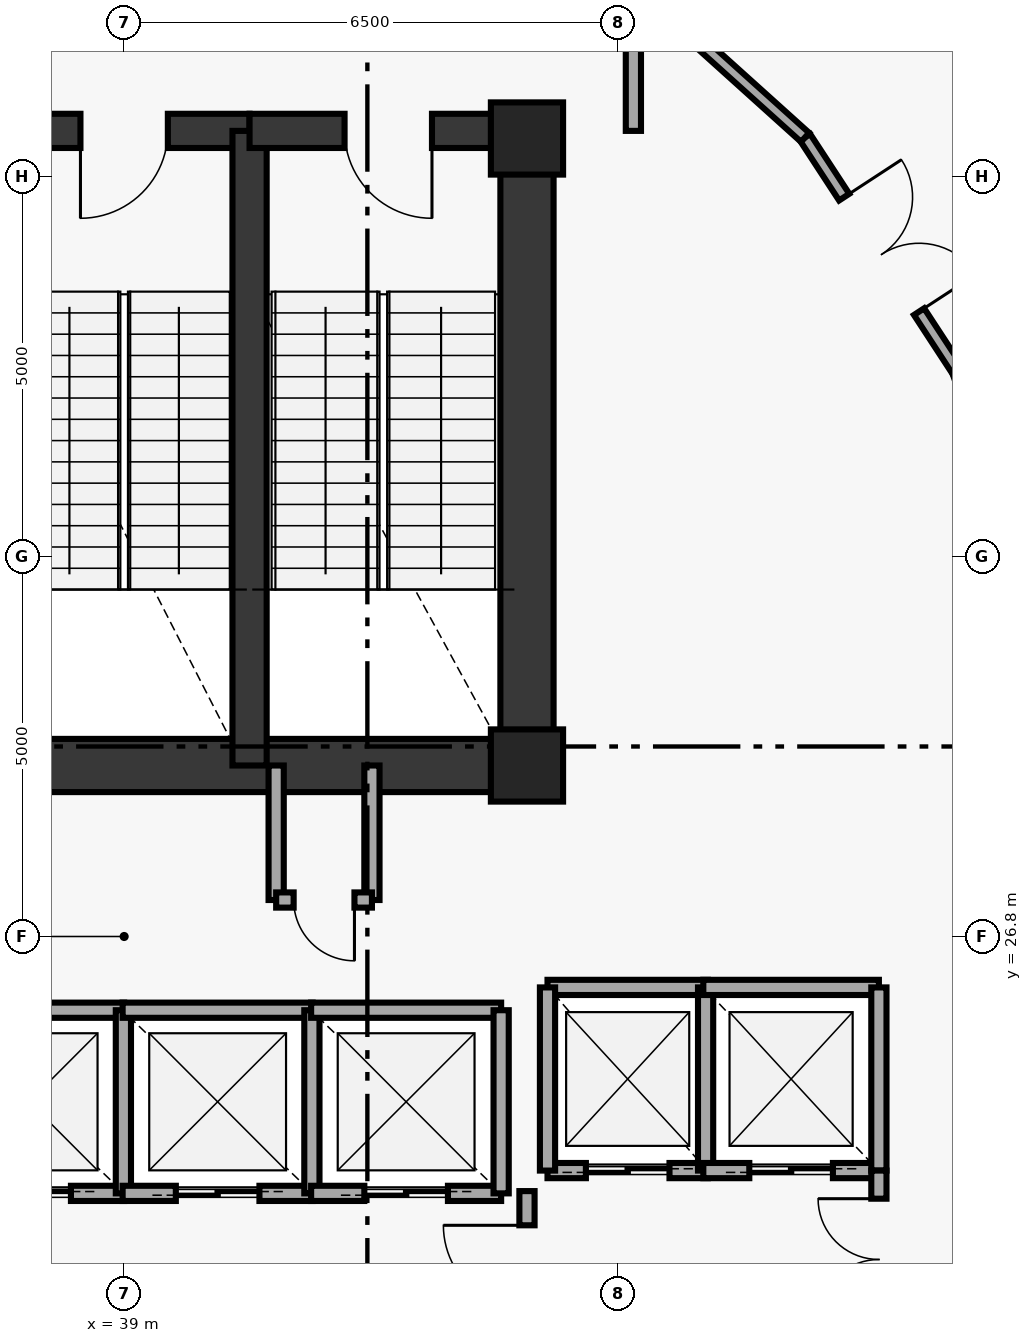
"""IFC4 building model, lengths in metres.
Left out: names, types, materials, properties, quantities, classifications, styles, units other than length and angle.
Written with IfcOpenShell. Run it as: python <this file> out.ifc"""

import sys

from ifc_helpers import new_model, si_unit, direction, frame, frame_2d, origin, origin_2d, place, context, subcontext, project, spatial, rectangle, extrude, element, fill, save


model = new_model("IFC4")
c1 = context("Model", 3, precision=1e-05, world=origin(), true_north=direction((0.0, 1.0)))
c2 = subcontext(c1, "Body", "Model", "MODEL_VIEW")
j1 = project(units=[si_unit("LENGTHUNIT", "METRE"), si_unit("PLANEANGLEUNIT", "RADIAN")], contexts=[c1])
p1 = place(None, origin())
s1 = spatial("IfcSite", under=j1, at=p1, CompositionType="ELEMENT")
p2 = place(p1, origin())
s2 = spatial("IfcBuilding", under=s1, at=p2, CompositionType="ELEMENT")
p3 = place(p2, frame((0.0, 0.0, 113.25)))
s3 = spatial("IfcBuildingStorey", under=s2, at=p3, CompositionType="ELEMENT", Elevation=113.25)
for number, where, z_axis, x_axis in (
    (1, (44.3, 29.05, 0.0), (0.0, 0.0, 1.0), (1.0, 0.0, 0.0)),
    (2, (44.3, 37.3, 0.0), (0.0, 0.0, 1.0), (1.0, 0.0, 0.0)),
):
    element("IfcColumn", number, at=place(p3, frame(where, z_axis=z_axis, x_axis=x_axis)), inside=s3, PredefinedType="PILASTER", context=c2, shape_type="SweptSolid", body=[
        extrude(rectangle(XDim=0.95, YDim=0.95, at=origin_2d()), origin(), (0.0, 0.0, 1.0), 4.75),
    ])
p4 = place(p3, frame((44.3, 29.05, 0.0), z_axis=(0.0, 0.0, 1.0), x_axis=(0.0, 1.0, 0.0)))
e3 = element("IfcWall", 3, at=p4, inside=s3, PredefinedType="SHEAR", context=c2, shape_type="SweptSolid", body=[
    extrude(rectangle(XDim=8.35, YDim=0.7, at=frame_2d((4.175, 0.0))), origin(), (0.0, 0.0, 1.0), 4.75),
])
p5 = place(p3, frame((33.7, 29.05, 0.0), z_axis=(0.0, 0.0, 1.0), x_axis=(1.0, 0.0, 0.0)))
e4 = element("IfcWall", 4, at=p5, inside=s3, PredefinedType="SHEAR", context=c2, shape_type="SweptSolid", body=[
    extrude(rectangle(XDim=10.6, YDim=0.7, at=frame_2d((5.3, 0.0))), origin(), (0.0, 0.0, 1.0), 4.75),
])
p6 = place(p3, frame((40.65, 37.4, 0.0), z_axis=(0.0, 0.0, 1.0), x_axis=(-1.0, 0.0, 0.0)))
e5 = element("IfcWall", 5, at=p6, inside=s3, PredefinedType="SHEAR", context=c2, shape_type="SweptSolid", body=[
    extrude(rectangle(XDim=3.3, YDim=0.45, at=frame_2d((1.65, 0.0))), origin(), (0.0, 0.0, 1.0), 4.75),
])
p7 = place(p6, frame((1.075, 0.0, 0.0)))
e6 = element("IfcOpeningElement", 6, at=p7, cuts=e5, PredefinedType="OPENING", context=c2, shape_type="SweptSolid", body=[
    extrude(rectangle(XDim=1.15, YDim=2.15, at=frame_2d((0.575, 1.075))), frame((0.0, 0.235, 0.0), z_axis=(0.0, -1.0, 0.0), x_axis=(1.0, 0.0, 0.0)), (0.0, 0.0, 1.0), 0.47),
])
p8 = place(p3, frame((40.65, 29.05, 0.0), z_axis=(0.0, 0.0, 1.0), x_axis=(0.0, 1.0, 0.0)))
e7 = element("IfcWall", 7, at=p8, inside=s3, PredefinedType="SHEAR", context=c2, shape_type="SweptSolid", body=[
    extrude(rectangle(XDim=8.35, YDim=0.45, at=frame_2d((4.175, 0.0))), origin(), (0.0, 0.0, 1.0), 4.75),
])
p9 = place(p3, frame((44.3, 37.4, 0.0), z_axis=(0.0, 0.0, 1.0), x_axis=(-1.0, 0.0, 0.0)))
e8 = element("IfcWall", 8, at=p9, inside=s3, PredefinedType="SHEAR", context=c2, shape_type="SweptSolid", body=[
    extrude(rectangle(XDim=3.65, YDim=0.45, at=frame_2d((1.825, 0.0))), origin(), (0.0, 0.0, 1.0), 4.75),
])
p10 = place(p9, frame((1.25, 0.0, 0.0)))
e9 = element("IfcOpeningElement", 9, at=p10, cuts=e8, PredefinedType="OPENING", context=c2, shape_type="SweptSolid", body=[
    extrude(rectangle(XDim=1.15, YDim=2.15, at=frame_2d((0.575, 1.075))), frame((0.0, 0.235, 0.0), z_axis=(0.0, -1.0, 0.0), x_axis=(1.0, 0.0, 0.0)), (0.0, 0.0, 1.0), 0.47),
])
p11 = place(p3, frame((45.7, 37.4, 0.0), z_axis=(0.0, 0.0, 1.0), x_axis=(0.0, 1.0, 0.0)))
e10 = element("IfcWall", 10, at=p11, inside=s3, PredefinedType="SOLIDWALL", context=c2, shape_type="SweptSolid", body=[
    extrude(rectangle(XDim=1.88, YDim=0.2, at=frame_2d((0.94, 0.0))), origin(), (0.0, 0.0, 1.0), 4.75),
])
for number, where, z_axis, x_axis in (
    (11, (41.0, 27.28, 0.0), (0.0, 0.0, 1.0), (0.0, 1.0, 0.0)),
    (12, (42.26, 27.28, 0.0), (0.0, 0.0, 1.0), (0.0, 1.0, 0.0)),
):
    element("IfcWall", number, at=place(p3, frame(where, z_axis=z_axis, x_axis=x_axis)), inside=s3, PredefinedType="SOLIDWALL", context=c2, shape_type="SweptSolid", body=[
        extrude(rectangle(XDim=1.77, YDim=0.2, at=frame_2d((0.885, 0.0))), origin(), (0.0, 0.0, 1.0), 4.75),
    ])
p12 = place(p3, frame((41.0, 27.28, 0.0), z_axis=(0.0, 0.0, 1.0), x_axis=(1.0, 0.0, 0.0)))
e13 = element("IfcWall", 13, at=p12, inside=s3, PredefinedType="SOLIDWALL", context=c2, shape_type="SweptSolid", body=[
    extrude(rectangle(XDim=1.26, YDim=0.2, at=frame_2d((0.63, 0.0))), origin(), (0.0, 0.0, 1.0), 4.75),
])
p13 = place(p12, frame((0.23, 0.0, 0.0)))
e14 = element("IfcOpeningElement", 14, at=p13, cuts=e13, PredefinedType="OPENING", context=c2, shape_type="SweptSolid", body=[
    extrude(rectangle(XDim=0.8, YDim=2.05, at=frame_2d((0.4, 1.025))), frame((0.0, 0.11, 0.0), z_axis=(0.0, -1.0, 0.0), x_axis=(1.0, 0.0, 0.0)), (0.0, 0.0, 1.0), 0.22),
])
p14 = place(p3, frame((44.57, 23.72, 0.0), z_axis=(0.0, 0.0, 1.0), x_axis=(1.0, 0.0, 0.0)))
e15 = element("IfcWall", 15, at=p14, inside=s3, PredefinedType="SOLIDWALL", context=c2, shape_type="SweptSolid", body=[
    extrude(rectangle(XDim=2.11, YDim=0.2, at=frame_2d((1.055, 0.0))), origin(), (0.0, 0.0, 1.0), 4.75),
])
p15 = place(p14, frame((0.505, 0.0, 0.0)))
e16 = element("IfcOpeningElement", 16, at=p15, cuts=e15, PredefinedType="OPENING", context=c2, shape_type="SweptSolid", body=[
    extrude(rectangle(XDim=1.1, YDim=2.15, at=frame_2d((0.55, 1.075))), frame((0.0, 0.11, 0.0), z_axis=(0.0, -1.0, 0.0), x_axis=(1.0, 0.0, 0.0)), (0.0, 0.0, 1.0), 0.22),
])
p16 = place(p3, frame((44.57, 26.13, 0.0), z_axis=(0.0, 0.0, 1.0), x_axis=(1.0, 0.0, 0.0)))
e17 = element("IfcWall", 17, at=p16, inside=s3, PredefinedType="SOLIDWALL", context=c2, shape_type="SweptSolid", body=[
    extrude(rectangle(XDim=2.11, YDim=0.2, at=frame_2d((1.055, 0.0))), origin(), (0.0, 0.0, 1.0), 4.75),
])
for number, where, z_axis, x_axis in (
    (18, (44.57, 23.72, 0.0), (0.0, 0.0, 1.0), (0.0, 1.0, 0.0)),
    (19, (46.65, 23.72, 0.0), (0.0, 0.0, 1.0), (0.0, 1.0, 0.0)),
):
    element("IfcWall", number, at=place(p3, frame(where, z_axis=z_axis, x_axis=x_axis)), inside=s3, PredefinedType="SOLIDWALL", context=c2, shape_type="SweptSolid", body=[
        extrude(rectangle(XDim=2.41, YDim=0.2, at=frame_2d((1.205, 0.0))), origin(), (0.0, 0.0, 1.0), 4.75),
    ])
p17 = place(p3, frame((46.62, 23.72, 0.0), z_axis=(0.0, 0.0, 1.0), x_axis=(1.0, 0.0, 0.0)))
e20 = element("IfcWall", 20, at=p17, inside=s3, PredefinedType="SOLIDWALL", context=c2, shape_type="SweptSolid", body=[
    extrude(rectangle(XDim=2.31, YDim=0.2, at=frame_2d((1.155, 0.0))), origin(), (0.0, 0.0, 1.0), 4.75),
])
p18 = place(p17, frame((0.605, 0.0, 0.0)))
e21 = element("IfcOpeningElement", 21, at=p18, cuts=e20, PredefinedType="OPENING", context=c2, shape_type="SweptSolid", body=[
    extrude(rectangle(XDim=1.1, YDim=2.15, at=frame_2d((0.55, 1.075))), frame((0.0, 0.11, 0.0), z_axis=(0.0, -1.0, 0.0), x_axis=(1.0, 0.0, 0.0)), (0.0, 0.0, 1.0), 0.22),
])
p19 = place(p3, frame((46.62, 26.13, 0.0), z_axis=(0.0, 0.0, 1.0), x_axis=(1.0, 0.0, 0.0)))
e22 = element("IfcWall", 22, at=p19, inside=s3, PredefinedType="SOLIDWALL", context=c2, shape_type="SweptSolid", body=[
    extrude(rectangle(XDim=2.31, YDim=0.2, at=frame_2d((1.155, 0.0))), origin(), (0.0, 0.0, 1.0), 4.75),
])
p20 = place(p3, frame((48.93, 23.72, 0.0), z_axis=(0.0, 0.0, 1.0), x_axis=(0.0, 1.0, 0.0)))
e23 = element("IfcWall", 23, at=p20, inside=s3, PredefinedType="SOLIDWALL", context=c2, shape_type="SweptSolid", body=[
    extrude(rectangle(XDim=2.41, YDim=0.2, at=frame_2d((1.205, 0.0))), origin(), (0.0, 0.0, 1.0), 4.75),
])
p21 = place(p3, frame((36.5, 23.42, 0.0), z_axis=(0.0, 0.0, 1.0), x_axis=(1.0, 0.0, 0.0)))
e24 = element("IfcWall", 24, at=p21, inside=s3, PredefinedType="SOLIDWALL", context=c2, shape_type="SweptSolid", body=[
    extrude(rectangle(XDim=2.5, YDim=0.2, at=frame_2d((1.25, 0.0))), origin(), (0.0, 0.0, 1.0), 4.75),
])
p22 = place(p21, frame((0.7, 0.0, 0.0)))
e25 = element("IfcOpeningElement", 25, at=p22, cuts=e24, PredefinedType="OPENING", context=c2, shape_type="SweptSolid", body=[
    extrude(rectangle(XDim=1.1, YDim=2.15, at=frame_2d((0.55, 1.075))), frame((0.0, 0.11, 0.0), z_axis=(0.0, -1.0, 0.0), x_axis=(1.0, 0.0, 0.0)), (0.0, 0.0, 1.0), 0.22),
])
p23 = place(p3, frame((36.5, 25.83, 0.0), z_axis=(0.0, 0.0, 1.0), x_axis=(1.0, 0.0, 0.0)))
e26 = element("IfcWall", 26, at=p23, inside=s3, PredefinedType="SOLIDWALL", context=c2, shape_type="SweptSolid", body=[
    extrude(rectangle(XDim=2.5, YDim=0.2, at=frame_2d((1.25, 0.0))), origin(), (0.0, 0.0, 1.0), 4.75),
])
p24 = place(p3, frame((38.99, 23.42, 0.0), z_axis=(0.0, 0.0, 1.0), x_axis=(0.0, 1.0, 0.0)))
e27 = element("IfcWall", 27, at=p24, inside=s3, PredefinedType="SOLIDWALL", context=c2, shape_type="SweptSolid", body=[
    extrude(rectangle(XDim=2.41, YDim=0.2, at=frame_2d((1.205, 0.0))), origin(), (0.0, 0.0, 1.0), 4.75),
])
p25 = place(p3, frame((38.98, 23.42, 0.0), z_axis=(0.0, 0.0, 1.0), x_axis=(1.0, 0.0, 0.0)))
e28 = element("IfcWall", 28, at=p25, inside=s3, PredefinedType="SOLIDWALL", context=c2, shape_type="SweptSolid", body=[
    extrude(rectangle(XDim=2.5, YDim=0.2, at=frame_2d((1.25, 0.0))), origin(), (0.0, 0.0, 1.0), 4.75),
])
p26 = place(p25, frame((0.7, 0.0, 0.0)))
e29 = element("IfcOpeningElement", 29, at=p26, cuts=e28, PredefinedType="OPENING", context=c2, shape_type="SweptSolid", body=[
    extrude(rectangle(XDim=1.1, YDim=2.15, at=frame_2d((0.55, 1.075))), frame((0.0, 0.11, 0.0), z_axis=(0.0, -1.0, 0.0), x_axis=(1.0, 0.0, 0.0)), (0.0, 0.0, 1.0), 0.22),
])
p27 = place(p3, frame((38.98, 25.83, 0.0), z_axis=(0.0, 0.0, 1.0), x_axis=(1.0, 0.0, 0.0)))
e30 = element("IfcWall", 30, at=p27, inside=s3, PredefinedType="SOLIDWALL", context=c2, shape_type="SweptSolid", body=[
    extrude(rectangle(XDim=2.5, YDim=0.2, at=frame_2d((1.25, 0.0))), origin(), (0.0, 0.0, 1.0), 4.75),
])
p28 = place(p3, frame((41.47, 23.42, 0.0), z_axis=(0.0, 0.0, 1.0), x_axis=(0.0, 1.0, 0.0)))
e31 = element("IfcWall", 31, at=p28, inside=s3, PredefinedType="SOLIDWALL", context=c2, shape_type="SweptSolid", body=[
    extrude(rectangle(XDim=2.41, YDim=0.2, at=frame_2d((1.205, 0.0))), origin(), (0.0, 0.0, 1.0), 4.75),
])
p29 = place(p3, frame((41.46, 23.42, 0.0), z_axis=(0.0, 0.0, 1.0), x_axis=(1.0, 0.0, 0.0)))
e32 = element("IfcWall", 32, at=p29, inside=s3, PredefinedType="SOLIDWALL", context=c2, shape_type="SweptSolid", body=[
    extrude(rectangle(XDim=2.5, YDim=0.2, at=frame_2d((1.25, 0.0))), origin(), (0.0, 0.0, 1.0), 4.75),
])
p30 = place(p29, frame((0.7, 0.0, 0.0)))
e33 = element("IfcOpeningElement", 33, at=p30, cuts=e32, PredefinedType="OPENING", context=c2, shape_type="SweptSolid", body=[
    extrude(rectangle(XDim=1.1, YDim=2.15, at=frame_2d((0.55, 1.075))), frame((0.0, 0.11, 0.0), z_axis=(0.0, -1.0, 0.0), x_axis=(1.0, 0.0, 0.0)), (0.0, 0.0, 1.0), 0.22),
])
p31 = place(p3, frame((41.46, 25.83, 0.0), z_axis=(0.0, 0.0, 1.0), x_axis=(1.0, 0.0, 0.0)))
e34 = element("IfcWall", 34, at=p31, inside=s3, PredefinedType="SOLIDWALL", context=c2, shape_type="SweptSolid", body=[
    extrude(rectangle(XDim=2.5, YDim=0.2, at=frame_2d((1.25, 0.0))), origin(), (0.0, 0.0, 1.0), 4.75),
])
p32 = place(p3, frame((43.96, 23.42, 0.0), z_axis=(0.0, 0.0, 1.0), x_axis=(0.0, 1.0, 0.0)))
e35 = element("IfcWall", 35, at=p32, inside=s3, PredefinedType="SOLIDWALL", context=c2, shape_type="SweptSolid", body=[
    extrude(rectangle(XDim=2.41, YDim=0.2, at=frame_2d((1.205, 0.0))), origin(), (0.0, 0.0, 1.0), 4.75),
])
p33 = place(p3, frame((48.93, 21.38, 0.0), z_axis=(0.0, 0.0, 1.0), x_axis=(0.0, 1.0, 0.0)))
e36 = element("IfcWall", 36, at=p33, inside=s3, PredefinedType="SOLIDWALL", context=c2, shape_type="SweptSolid", body=[
    extrude(rectangle(XDim=2.34, YDim=0.2, at=frame_2d((1.17, 0.0))), origin(), (0.0, 0.0, 1.0), 4.75),
])
p34 = place(p33, frame((0.37, 0.0, 0.0)))
e37 = element("IfcOpeningElement", 37, at=p34, cuts=e36, PredefinedType="OPENING", context=c2, shape_type="SweptSolid", body=[
    extrude(rectangle(XDim=1.6, YDim=2.2, at=frame_2d((0.8, 1.1))), frame((0.0, 0.11, 0.0), z_axis=(0.0, -1.0, 0.0), x_axis=(1.0, 0.0, 0.0)), (0.0, 0.0, 1.0), 0.22),
])
p35 = place(p3, frame((44.3, 21.35, 0.0), z_axis=(0.0, 0.0, 1.0), x_axis=(0.0, 1.0, 0.0)))
e38 = element("IfcWall", 38, at=p35, inside=s3, PredefinedType="SOLIDWALL", context=c2, shape_type="SweptSolid", body=[
    extrude(rectangle(XDim=2.1, YDim=0.2, at=frame_2d((1.05, 0.0))), origin(), (0.0, 0.0, 1.0), 4.135),
])
p36 = place(p35, frame((0.55, 0.0, 0.0)))
e39 = element("IfcOpeningElement", 39, at=p36, cuts=e38, PredefinedType="OPENING", context=c2, shape_type="SweptSolid", body=[
    extrude(rectangle(XDim=1.1, YDim=2.15, at=frame_2d((0.55, 1.075))), frame((0.0, 0.11, 0.0), z_axis=(0.0, -1.0, 0.0), x_axis=(1.0, 0.0, 0.0)), (0.0, 0.0, 1.0), 0.22),
])
p37 = place(p3, frame((51.238, 30.649, 0.0), z_axis=(0.0, 0.0, 1.0), x_axis=(-0.332685787644, 0.943037733444, 0.0)))
e40 = element("IfcWall", 40, at=p37, inside=s3, PredefinedType="PARTITIONING", context=c2, shape_type="SweptSolid", body=[
    extrude(rectangle(XDim=3.803, YDim=0.16, at=frame_2d((1.901, 0.0))), origin(), (0.0, 0.0, 1.0), 4.75),
])
p38 = place(p3, frame((47.959, 37.315, 0.0), z_axis=(0.0, 0.0, 1.0), x_axis=(0.547283325884, -0.836947406477, 0.0)))
e41 = element("IfcWall", 41, at=p38, inside=s3, PredefinedType="PARTITIONING", context=c2, shape_type="SweptSolid", body=[
    extrude(rectangle(XDim=3.68, YDim=0.16, at=frame_2d((1.84, 0.0))), origin(), (0.0, 0.0, 1.0), 4.75),
])
p39 = place(p38, frame((0.94, 0.0, 0.0)))
e42 = element("IfcOpeningElement", 42, at=p39, cuts=e41, PredefinedType="OPENING", context=c2, shape_type="SweptSolid", body=[
    extrude(rectangle(XDim=1.8, YDim=2.3, at=frame_2d((0.9, 1.15))), frame((0.0, 0.09, 0.0), z_axis=(0.0, -1.0, 0.0), x_axis=(1.0, 0.0, 0.0)), (0.0, 0.0, 1.0), 0.18),
])
p40 = place(p3, frame((47.959, 37.315, 0.0), z_axis=(0.0, 0.0, 1.0), x_axis=(-0.743094720901, 0.669186248939, 0.0)))
e43 = element("IfcWall", 43, at=p40, inside=s3, PredefinedType="PARTITIONING", context=c2, shape_type="SweptSolid", body=[
    extrude(rectangle(XDim=3.531, YDim=0.16, at=frame_2d((1.766, 0.0))), origin(), (0.0, 0.0, 1.0), 4.75),
])
p41 = place(p3, frame((49.973, 19.365, 0.0), z_axis=(0.0, 0.0, 1.0), x_axis=(0.332705930675, 0.943030627124, 0.0)))
e44 = element("IfcWall", 44, at=p41, inside=s3, PredefinedType="PARTITIONING", context=c2, shape_type="SweptSolid", body=[
    extrude(rectangle(XDim=3.802, YDim=0.16, at=frame_2d((1.901, 0.0))), origin(), (0.0, 0.0, 1.0), 4.75),
])
p42 = place(p7, origin())
e45 = element("IfcDoor", 45, at=p42, inside=s3, OperationType="SINGLE_SWING_RIGHT", PredefinedType="DOOR", context=c2, shape_type="SweptSolid", body=[
    extrude(rectangle(XDim=1.15, YDim=2.15, at=frame_2d((0.575, 1.075))), frame((0.0, 0.025, 0.0), z_axis=(0.0, -1.0, 0.0), x_axis=(1.0, 0.0, 0.0)), (0.0, 0.0, 1.0), 0.05),
])
fill(e6, e45)
p43 = place(p10, origin())
e46 = element("IfcDoor", 46, at=p43, inside=s3, OperationType="SINGLE_SWING_LEFT", PredefinedType="DOOR", context=c2, shape_type="SweptSolid", body=[
    extrude(rectangle(XDim=1.15, YDim=2.15, at=frame_2d((0.575, 1.075))), frame((0.0, 0.025, 0.0), z_axis=(0.0, -1.0, 0.0), x_axis=(1.0, 0.0, 0.0)), (0.0, 0.0, 1.0), 0.05),
])
fill(e9, e46)
p44 = place(p13, origin())
e47 = element("IfcDoor", 47, at=p44, inside=s3, OperationType="SINGLE_SWING_RIGHT", PredefinedType="DOOR", context=c2, shape_type="SweptSolid", body=[
    extrude(rectangle(XDim=0.8, YDim=2.05, at=frame_2d((0.4, 1.025))), frame((0.0, 0.025, 0.0), z_axis=(0.0, -1.0, 0.0), x_axis=(1.0, 0.0, 0.0)), (0.0, 0.0, 1.0), 0.05),
])
fill(e14, e47)
p45 = place(p15, origin())
e48 = element("IfcDoor", 48, at=p45, inside=s3, OperationType="DOUBLE_DOOR_SLIDING", PredefinedType="DOOR", context=c2, shape_type="SweptSolid", body=[
    extrude(rectangle(XDim=1.1, YDim=2.15, at=frame_2d((0.55, 1.075))), frame((0.0, 0.025, 0.0), z_axis=(0.0, -1.0, 0.0), x_axis=(1.0, 0.0, 0.0)), (0.0, 0.0, 1.0), 0.05),
])
fill(e16, e48)
p46 = place(p18, origin())
e49 = element("IfcDoor", 49, at=p46, inside=s3, OperationType="DOUBLE_DOOR_SLIDING", PredefinedType="DOOR", context=c2, shape_type="SweptSolid", body=[
    extrude(rectangle(XDim=1.1, YDim=2.15, at=frame_2d((0.55, 1.075))), frame((0.0, 0.025, 0.0), z_axis=(0.0, -1.0, 0.0), x_axis=(1.0, 0.0, 0.0)), (0.0, 0.0, 1.0), 0.05),
])
fill(e21, e49)
p47 = place(p22, origin())
e50 = element("IfcDoor", 50, at=p47, inside=s3, OperationType="DOUBLE_DOOR_SLIDING", PredefinedType="DOOR", context=c2, shape_type="SweptSolid", body=[
    extrude(rectangle(XDim=1.1, YDim=2.15, at=frame_2d((0.55, 1.075))), frame((0.0, 0.025, 0.0), z_axis=(0.0, -1.0, 0.0), x_axis=(1.0, 0.0, 0.0)), (0.0, 0.0, 1.0), 0.05),
])
fill(e25, e50)
p48 = place(p26, origin())
e51 = element("IfcDoor", 51, at=p48, inside=s3, OperationType="DOUBLE_DOOR_SLIDING", PredefinedType="DOOR", context=c2, shape_type="SweptSolid", body=[
    extrude(rectangle(XDim=1.1, YDim=2.15, at=frame_2d((0.55, 1.075))), frame((0.0, 0.025, 0.0), z_axis=(0.0, -1.0, 0.0), x_axis=(1.0, 0.0, 0.0)), (0.0, 0.0, 1.0), 0.05),
])
fill(e29, e51)
p49 = place(p30, origin())
e52 = element("IfcDoor", 52, at=p49, inside=s3, OperationType="DOUBLE_DOOR_SLIDING", PredefinedType="DOOR", context=c2, shape_type="SweptSolid", body=[
    extrude(rectangle(XDim=1.1, YDim=2.15, at=frame_2d((0.55, 1.075))), frame((0.0, 0.025, 0.0), z_axis=(0.0, -1.0, 0.0), x_axis=(1.0, 0.0, 0.0)), (0.0, 0.0, 1.0), 0.05),
])
fill(e33, e52)
p50 = place(p34, origin())
e53 = element("IfcDoor", 53, at=p50, inside=s3, OperationType="DOUBLE_DOOR_SINGLE_SWING", PredefinedType="DOOR", context=c2, shape_type="SweptSolid", body=[
    extrude(rectangle(XDim=1.6, YDim=2.2, at=frame_2d((0.8, 1.1))), frame((0.0, 0.025, 0.0), z_axis=(0.0, -1.0, 0.0), x_axis=(1.0, 0.0, 0.0)), (0.0, 0.0, 1.0), 0.05),
])
fill(e37, e53)
p51 = place(p36, origin())
e54 = element("IfcDoor", 54, at=p51, inside=s3, OperationType="SINGLE_SWING_RIGHT", PredefinedType="DOOR", context=c2, shape_type="SweptSolid", body=[
    extrude(rectangle(XDim=1.1, YDim=2.15, at=frame_2d((0.55, 1.075))), frame((0.0, 0.025, 0.0), z_axis=(0.0, -1.0, 0.0), x_axis=(1.0, 0.0, 0.0)), (0.0, 0.0, 1.0), 0.05),
])
fill(e39, e54)
p52 = place(p39, origin())
e55 = element("IfcDoor", 55, at=p52, inside=s3, OperationType="DOUBLE_DOOR_SINGLE_SWING", PredefinedType="DOOR", context=c2, shape_type="SweptSolid", body=[
    extrude(rectangle(XDim=1.8, YDim=2.3, at=frame_2d((0.9, 1.15))), frame((0.0, 0.025, 0.0), z_axis=(0.0, -1.0, 0.0), x_axis=(1.0, 0.0, 0.0)), (0.0, 0.0, 1.0), 0.05),
])
fill(e42, e55)
save(model, sys.argv[1])
